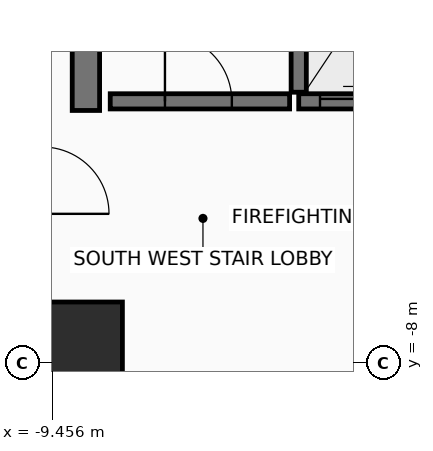
"""IFC4 building model, lengths in metres.
Left out: names, types, materials, properties, quantities, classifications, styles, units other than length and angle.
Written with IfcOpenShell. Run it as: python <this file> out.ifc"""

import sys

from ifc_helpers import new_model, si_unit, direction, frame, frame_2d, origin, origin_2d, place, context, subcontext, project, spatial, rectangle, extrude, element, fill, save


model = new_model("IFC4")
c1 = context("Model", 3, precision=1e-05, world=origin(), true_north=direction((0.0, 1.0)))
c2 = subcontext(c1, "Body", "Model", "MODEL_VIEW")
j1 = project(units=[si_unit("LENGTHUNIT", "METRE"), si_unit("PLANEANGLEUNIT", "RADIAN")], contexts=[c1])
p1 = place(None, origin())
s1 = spatial("IfcSite", under=j1, at=p1, CompositionType="ELEMENT")
p2 = place(p1, origin())
s2 = spatial("IfcBuilding", under=s1, at=p2, CompositionType="ELEMENT")
p3 = place(p2, frame((0.0, 0.0, 170.5)))
s3 = spatial("IfcBuildingStorey", under=s2, at=p3, CompositionType="ELEMENT", Elevation=170.5)
p4 = place(p3, frame((-8.9, -7.6, 0.0), z_axis=(0.0, 0.0, 1.0), x_axis=(1.0, 0.0, 0.0)))
e1 = element("IfcColumn", 1, at=p4, inside=s3, PredefinedType="COLUMN", context=c2, shape_type="SweptSolid", body=[
    extrude(rectangle(XDim=1.2, YDim=1.2, at=origin_2d()), origin(), (0.0, 0.0, 1.0), 3.6),
])
p5 = place(p3, frame((-8.9, -3.85, 0.0), z_axis=(0.0, 0.0, 1.0), x_axis=(0.0, 1.0, 0.0)))
e2 = element("IfcWall", 2, at=p5, inside=s3, PredefinedType="SHEAR", context=c2, shape_type="SweptSolid", body=[
    extrude(rectangle(XDim=10.7, YDim=0.45, at=frame_2d((5.35, 0.0))), origin(), (0.0, 0.0, 1.0), 3.42),
])
p6 = place(p3, frame((-5.4, -3.55, 0.0), z_axis=(0.0, 0.0, 1.0), x_axis=(0.0, 1.0, 0.0)))
e3 = element("IfcWall", 3, at=p6, inside=s3, PredefinedType="SHEAR", context=c2, shape_type="SweptSolid", body=[
    extrude(rectangle(XDim=7.3, YDim=0.25, at=frame_2d((3.65, 0.0))), origin(), (0.0, 0.0, 1.0), 3.42),
])
p7 = place(p3, frame((-8.5, -3.7, 0.0), z_axis=(0.0, 0.0, 1.0), x_axis=(1.0, 0.0, 0.0)))
e4 = element("IfcWall", 4, at=p7, inside=s3, PredefinedType="SHEAR", context=c2, shape_type="SweptSolid", body=[
    extrude(rectangle(XDim=2.95, YDim=0.25, at=frame_2d((1.475, 0.0))), origin(), (0.0, 0.0, 1.0), 3.42),
])
p8 = place(p7, frame((0.9, 0.0, 0.0)))
e5 = element("IfcOpeningElement", 5, at=p8, cuts=e4, PredefinedType="OPENING", context=c2, shape_type="SweptSolid", body=[
    extrude(rectangle(XDim=1.1, YDim=2.15, at=frame_2d((0.55, 1.075))), frame((0.0, 0.135, 0.0), z_axis=(0.0, -1.0, 0.0), x_axis=(1.0, 0.0, 0.0)), (0.0, 0.0, 1.0), 0.27),
])
p9 = place(p3, frame((-5.4, -3.7, 0.0), z_axis=(0.0, 0.0, 1.0), x_axis=(1.0, 0.0, 0.0)))
e6 = element("IfcWall", 6, at=p9, inside=s3, PredefinedType="SHEAR", context=c2, shape_type="SweptSolid", body=[
    extrude(rectangle(XDim=1.9, YDim=0.25, at=frame_2d((0.95, 0.0))), origin(), (0.0, 0.0, 1.0), 3.42),
])
p10 = place(p9, frame((0.35, 0.0, 0.0)))
e7 = element("IfcOpeningElement", 7, at=p10, cuts=e6, PredefinedType="OPENING", context=c2, shape_type="SweptSolid", body=[
    extrude(rectangle(XDim=1.2, YDim=2.2, at=frame_2d((0.6, 1.1))), frame((0.0, 0.135, 0.0), z_axis=(0.0, -1.0, 0.0), x_axis=(1.0, 0.0, 0.0)), (0.0, 0.0, 1.0), 0.27),
])
p11 = place(p8, origin())
e8 = element("IfcDoor", 8, at=p11, inside=s3, OperationType="SINGLE_SWING_LEFT", PredefinedType="DOOR", context=c2, shape_type="SweptSolid", body=[
    extrude(rectangle(XDim=1.1, YDim=2.15, at=frame_2d((0.55, 1.075))), frame((0.0, 0.025, 0.0), z_axis=(0.0, -1.0, 0.0), x_axis=(1.0, 0.0, 0.0)), (0.0, 0.0, 1.0), 0.05),
])
fill(e5, e8)
p12 = place(p10, origin())
e9 = element("IfcDoor", 9, at=p12, inside=s3, OperationType="SLIDING_TO_RIGHT", PredefinedType="DOOR", context=c2, shape_type="SweptSolid", body=[
    extrude(rectangle(XDim=1.2, YDim=2.2, at=frame_2d((0.6, 1.1))), frame((0.0, 0.025, 0.0), z_axis=(0.0, -1.0, 0.0), x_axis=(1.0, 0.0, 0.0)), (0.0, 0.0, 1.0), 0.05),
])
fill(e7, e9)
save(model, sys.argv[1])
